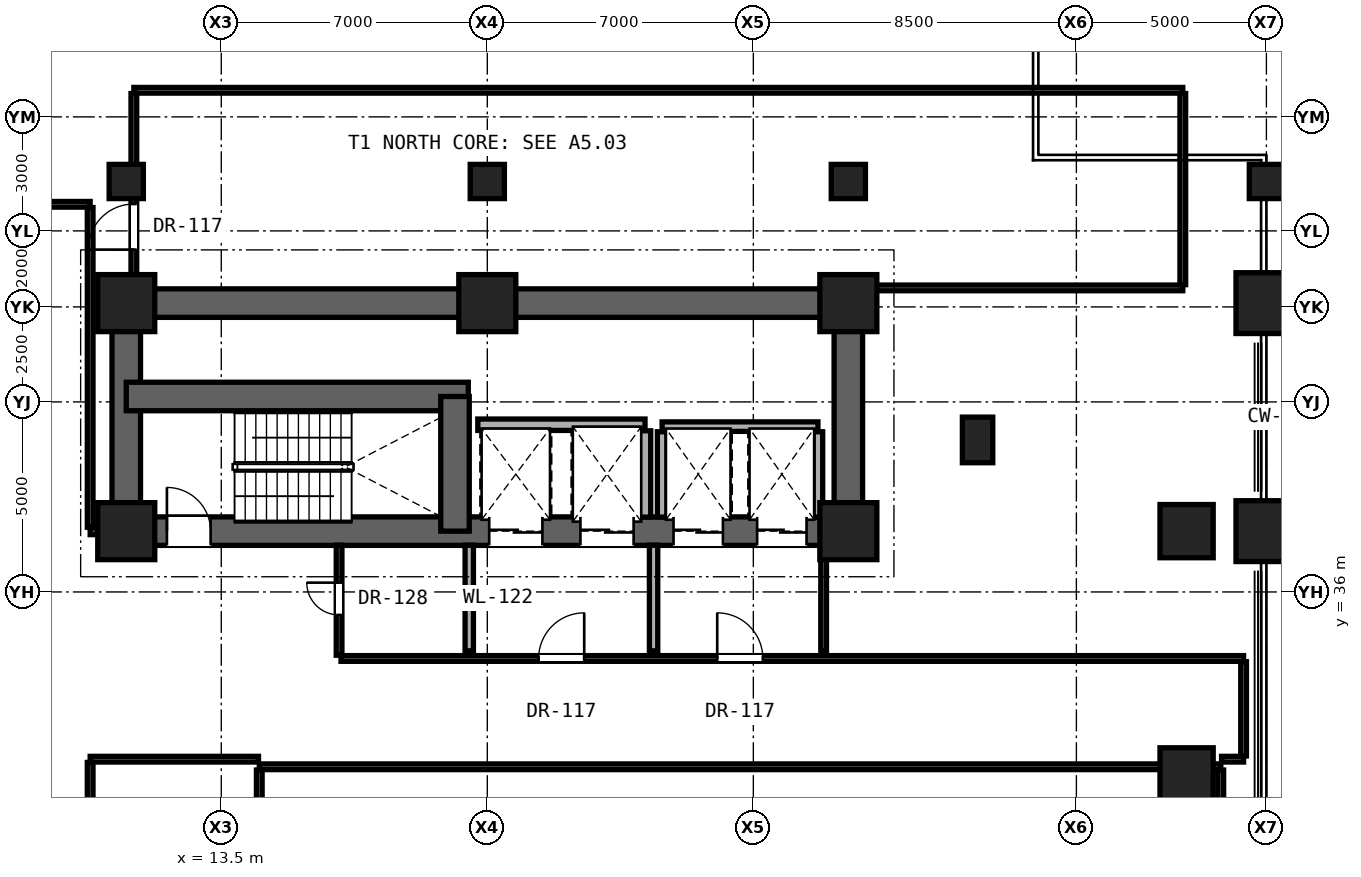
"""IFC4 building model, lengths in metres.
Left out: names, types, materials, properties, quantities, classifications, styles, units other than length and angle.
Written with IfcOpenShell. Run it as: python <this file> out.ifc"""

import sys

from ifc_helpers import new_model, si_unit, direction, frame, frame_2d, origin, origin_2d, place, context, subcontext, project, spatial, rectangle, hollow_rectangle, extrude, element, fill, save


model = new_model("IFC4")
c1 = context("Model", 3, precision=1e-05, world=origin(), true_north=direction((0.0, 1.0)))
c2 = subcontext(c1, "Body", "Model", "MODEL_VIEW")
j1 = project(units=[si_unit("LENGTHUNIT", "METRE"), si_unit("PLANEANGLEUNIT", "RADIAN")], contexts=[c1])
p1 = place(None, origin())
s1 = spatial("IfcSite", under=j1, at=p1, CompositionType="ELEMENT")
p2 = place(p1, origin())
s2 = spatial("IfcBuilding", under=s1, at=p2, CompositionType="ELEMENT")
p3 = place(p2, frame((0.0, 0.0, 9.5)))
s3 = spatial("IfcBuildingStorey", under=s2, at=p3, CompositionType="ELEMENT", Elevation=9.5)
for number, where, z_axis, x_axis in (
    (1, (11.0, 37.6, 0.0), (0.0, 0.0, 1.0), (1.0, 0.0, 0.0)),
    (2, (30.0, 37.6, 0.0), (0.0, 0.0, 1.0), (1.0, 0.0, 0.0)),
    (3, (11.0, 43.6, 0.0), (0.0, 0.0, 1.0), (1.0, 0.0, 0.0)),
    (4, (20.5, 43.6, 0.0), (0.0, 0.0, 1.0), (1.0, 0.0, 0.0)),
    (5, (30.0, 43.6, 0.0), (0.0, 0.0, 1.0), (1.0, 0.0, 0.0)),
):
    element("IfcColumn", number, at=place(p3, frame(where, z_axis=z_axis, x_axis=x_axis)), inside=s3, PredefinedType="COLUMN", context=c2, shape_type="SweptSolid", body=[
        extrude(rectangle(XDim=1.5, YDim=1.5, at=origin_2d()), origin(), (0.0, 0.0, 1.0), 4.3),
    ])
for number, where, z_axis, x_axis in (
    (6, (38.9, 31.2, 0.0), (0.0, 0.0, 1.0), (1.0, 0.0, 0.0)),
    (7, (38.9, 37.6, 0.0), (0.0, 0.0, 1.0), (1.0, 0.0, 0.0)),
):
    element("IfcColumn", number, at=place(p3, frame(where, z_axis=z_axis, x_axis=x_axis)), inside=s3, PredefinedType="COLUMN", context=c2, shape_type="SweptSolid", body=[
        extrude(hollow_rectangle(XDim=1.4, YDim=1.4, WallThickness=0.08, at=origin_2d()), origin(), (0.0, 0.0, 1.0), 4.3),
    ])
p4 = place(p3, frame((33.4, 40.0, 0.0), z_axis=(0.0, 0.0, 1.0), x_axis=(1.0, 0.0, 0.0)))
e8 = element("IfcColumn", 8, at=p4, inside=s3, PredefinedType="PILASTER", context=c2, shape_type="SweptSolid", body=[
    extrude(rectangle(XDim=0.8, YDim=1.2, at=origin_2d()), origin(), (0.0, 0.0, 1.0), 4.3),
])
p5 = place(p3, frame((11.0, 43.6, 0.0), z_axis=(0.0, 0.0, 1.0), x_axis=(1.0, 0.0, 0.0)))
e9 = element("IfcWall", 9, at=p5, inside=s3, PredefinedType="SHEAR", context=c2, shape_type="SweptSolid", body=[
    extrude(rectangle(XDim=19.0, YDim=0.75, at=frame_2d((9.5, 0.0))), origin(), (0.0, 0.0, 1.0), 3.98),
])
for number, where, z_axis, x_axis in (
    (10, (11.0, 37.6, 0.0), (0.0, 0.0, 1.0), (0.0, 1.0, 0.0)),
    (11, (30.0, 37.6, 0.0), (0.0, 0.0, 1.0), (0.0, 1.0, 0.0)),
):
    element("IfcWall", number, at=place(p3, frame(where, z_axis=z_axis, x_axis=x_axis)), inside=s3, PredefinedType="SHEAR", context=c2, shape_type="SweptSolid", body=[
        extrude(rectangle(XDim=6.0, YDim=0.75, at=frame_2d((3.0, 0.0))), origin(), (0.0, 0.0, 1.0), 3.98),
    ])
p6 = place(p3, frame((11.0, 37.6, 0.0), z_axis=(0.0, 0.0, 1.0), x_axis=(1.0, 0.0, 0.0)))
e12 = element("IfcWall", 12, at=p6, inside=s3, PredefinedType="SHEAR", context=c2, shape_type="SweptSolid", body=[
    extrude(rectangle(XDim=19.0, YDim=0.75, at=frame_2d((9.5, 0.0))), origin(), (0.0, 0.0, 1.0), 3.98),
])
p7 = place(p6, frame((1.07, 0.0, 0.0)))
e13 = element("IfcOpeningElement", 13, at=p7, cuts=e12, PredefinedType="OPENING", context=c2, shape_type="SweptSolid", body=[
    extrude(rectangle(XDim=1.15, YDim=2.2, at=frame_2d((0.575, 1.1))), frame((0.0, 0.385, 0.0), z_axis=(0.0, -1.0, 0.0), x_axis=(1.0, 0.0, 0.0)), (0.0, 0.0, 1.0), 0.77),
])
p8 = place(p6, frame((9.55, 0.0, 0.0)))
e14 = element("IfcOpeningElement", 14, at=p8, cuts=e12, PredefinedType="OPENING", context=c2, shape_type="SweptSolid", body=[
    extrude(rectangle(XDim=1.4, YDim=2.35, at=frame_2d((0.7, 1.175))), frame((0.0, 0.385, 0.0), z_axis=(0.0, -1.0, 0.0), x_axis=(1.0, 0.0, 0.0)), (0.0, 0.0, 1.0), 0.77),
])
p9 = place(p6, frame((11.95, 0.0, 0.0)))
e15 = element("IfcOpeningElement", 15, at=p9, cuts=e12, PredefinedType="OPENING", context=c2, shape_type="SweptSolid", body=[
    extrude(rectangle(XDim=1.4, YDim=2.35, at=frame_2d((0.7, 1.175))), frame((0.0, 0.385, 0.0), z_axis=(0.0, -1.0, 0.0), x_axis=(1.0, 0.0, 0.0)), (0.0, 0.0, 1.0), 0.77),
])
p10 = place(p6, frame((14.4, 0.0, 0.0)))
e16 = element("IfcOpeningElement", 16, at=p10, cuts=e12, PredefinedType="OPENING", context=c2, shape_type="SweptSolid", body=[
    extrude(rectangle(XDim=1.3, YDim=2.3, at=frame_2d((0.65, 1.15))), frame((0.0, 0.385, 0.0), z_axis=(0.0, -1.0, 0.0), x_axis=(1.0, 0.0, 0.0)), (0.0, 0.0, 1.0), 0.77),
])
p11 = place(p6, frame((16.6, 0.0, 0.0)))
e17 = element("IfcOpeningElement", 17, at=p11, cuts=e12, PredefinedType="OPENING", context=c2, shape_type="SweptSolid", body=[
    extrude(rectangle(XDim=1.3, YDim=2.3, at=frame_2d((0.65, 1.15))), frame((0.0, 0.385, 0.0), z_axis=(0.0, -1.0, 0.0), x_axis=(1.0, 0.0, 0.0)), (0.0, 0.0, 1.0), 0.77),
])
p12 = place(p3, frame((11.0, 41.143, 0.0), z_axis=(0.0, 0.0, 1.0), x_axis=(1.0, 0.0, 0.0)))
e18 = element("IfcWall", 18, at=p12, inside=s3, PredefinedType="SHEAR", context=c2, shape_type="SweptSolid", body=[
    extrude(rectangle(XDim=9.0, YDim=0.75, at=frame_2d((4.5, 0.0))), origin(), (0.0, 0.0, 1.0), 3.98),
])
p13 = place(p3, frame((19.65, 37.6, 0.0), z_axis=(0.0, 0.0, 1.0), x_axis=(0.0, 1.0, 0.0)))
e19 = element("IfcWall", 19, at=p13, inside=s3, PredefinedType="SHEAR", context=c2, shape_type="SweptSolid", body=[
    extrude(rectangle(XDim=3.543, YDim=0.75, at=frame_2d((1.771, 0.0))), origin(), (0.0, 0.0, 1.0), 3.98),
])
for number, where, z_axis, x_axis in (
    (20, (41.0, 37.6, 0.0), (0.0, 0.0, 1.0), (1.0, 0.0, 0.0)),
    (21, (41.0, 43.6, 0.0), (0.0, 0.0, 1.0), (1.0, 0.0, 0.0)),
):
    element("IfcColumn", number, at=place(p3, frame(where, z_axis=z_axis, x_axis=x_axis)), inside=s3, PredefinedType="COLUMN", context=c2, shape_type="SweptSolid", body=[
        extrude(rectangle(XDim=1.6, YDim=1.6, at=origin_2d()), origin(), (0.0, 0.0, 1.0), 4.3),
    ])
for number, where, z_axis, x_axis in (
    (22, (11.0, 46.8, 0.0), (0.0, 0.0, 1.0), (1.0, 0.0, 0.0)),
    (23, (20.5, 46.8, 0.0), (0.0, 0.0, 1.0), (1.0, 0.0, 0.0)),
    (24, (30.0, 46.8, 0.0), (0.0, 0.0, 1.0), (1.0, 0.0, 0.0)),
    (25, (41.0, 46.8, 0.0), (0.0, 0.0, 1.0), (1.0, 0.0, 0.0)),
):
    element("IfcColumn", number, at=place(p3, frame(where, z_axis=z_axis, x_axis=x_axis)), inside=s3, PredefinedType="COLUMN", context=c2, shape_type="SweptSolid", body=[
        extrude(rectangle(XDim=0.9, YDim=0.9, at=origin_2d()), origin(), (0.0, 0.0, 1.0), 4.3),
    ])
p14 = place(p3, frame((14.5, 31.4, 0.0), z_axis=(0.0, 0.0, 1.0), x_axis=(1.0, 0.0, 0.0)))
e26 = element("IfcWall", 26, at=p14, inside=s3, PredefinedType="PARTITIONING", context=c2, shape_type="SweptSolid", body=[
    extrude(rectangle(XDim=25.3, YDim=0.15, at=frame_2d((12.65, 0.0))), origin(), (0.0, 0.0, 1.0), 2.932),
])
p15 = place(p3, frame((10.05, 31.6, 0.0), z_axis=(0.0, 0.0, 1.0), x_axis=(1.0, 0.0, 0.0)))
e27 = element("IfcWall", 27, at=p15, inside=s3, PredefinedType="PARTITIONING", context=c2, shape_type="SweptSolid", body=[
    extrude(rectangle(XDim=4.43, YDim=0.15, at=frame_2d((2.215, 0.0))), origin(), (0.0, 0.0, 1.0), 2.932),
])
p16 = place(p3, frame((39.82, 31.6, 0.0), z_axis=(0.0, 0.0, 1.0), x_axis=(1.0, 0.0, 0.0)))
e28 = element("IfcWall", 28, at=p16, inside=s3, PredefinedType="PARTITIONING", context=c2, shape_type="SweptSolid", body=[
    extrude(rectangle(XDim=0.58, YDim=0.15, at=frame_2d((0.29, 0.0))), origin(), (0.0, 0.0, 1.0), 3.98),
])
p17 = place(p3, frame((16.65, 34.25, 0.0), z_axis=(0.0, 0.0, 1.0), x_axis=(1.0, 0.0, 0.0)))
e29 = element("IfcWall", 29, at=p17, inside=s3, PredefinedType="PARTITIONING", context=c2, shape_type="SweptSolid", body=[
    extrude(rectangle(XDim=23.75, YDim=0.15, at=frame_2d((11.875, 0.0))), origin(), (0.0, 0.0, 1.0), 2.932),
])
p18 = place(p17, frame((5.2, 0.0, 0.0)))
e30 = element("IfcOpeningElement", 30, at=p18, cuts=e29, PredefinedType="OPENING", context=c2, shape_type="SweptSolid", body=[
    extrude(rectangle(XDim=1.2, YDim=2.25, at=frame_2d((0.6, 1.125))), frame((0.0, 0.085, 0.0), z_axis=(0.0, -1.0, 0.0), x_axis=(1.0, 0.0, 0.0)), (0.0, 0.0, 1.0), 0.17),
])
p19 = place(p17, frame((9.9, 0.0, 0.0)))
e31 = element("IfcOpeningElement", 31, at=p19, cuts=e29, PredefinedType="OPENING", context=c2, shape_type="SweptSolid", body=[
    extrude(rectangle(XDim=1.2, YDim=2.25, at=frame_2d((0.6, 1.125))), frame((0.0, 0.085, 0.0), z_axis=(0.0, -1.0, 0.0), x_axis=(1.0, 0.0, 0.0)), (0.0, 0.0, 1.0), 0.17),
])
p20 = place(p3, frame((10.05, 37.6, 0.0), z_axis=(0.0, 0.0, 1.0), x_axis=(1.0, 0.0, 0.0)))
e32 = element("IfcWall", 32, at=p20, inside=s3, PredefinedType="SHEAR", context=c2, shape_type="SweptSolid", body=[
    extrude(rectangle(XDim=0.185, YDim=0.185, at=frame_2d((0.093, 0.0))), origin(), (0.0, 0.0, 1.0), 3.98),
])
p21 = place(p3, frame((25.1, 40.35, 0.0), z_axis=(0.0, 0.0, 1.0), x_axis=(1.0, 0.0, 0.0)))
e33 = element("IfcWall", 33, at=p21, inside=s3, PredefinedType="SOLIDWALL", context=c2, shape_type="SweptSolid", body=[
    extrude(rectangle(XDim=4.1, YDim=0.25, at=frame_2d((2.05, 0.0))), origin(), (0.0, 0.0, 1.0), 3.98),
])
p22 = place(p3, frame((20.25, 40.4, 0.0), z_axis=(0.0, 0.0, 1.0), x_axis=(1.0, 0.0, 0.0)))
e34 = element("IfcWall", 34, at=p22, inside=s3, PredefinedType="SOLIDWALL", context=c2, shape_type="SweptSolid", body=[
    extrude(rectangle(XDim=4.4, YDim=0.3, at=frame_2d((2.2, 0.0))), origin(), (0.0, 0.0, 1.0), 3.98),
])
p23 = place(p3, frame((30.02, 44.0, 0.0), z_axis=(0.0, 0.0, 1.0), x_axis=(1.0, 0.0, 0.0)))
e35 = element("IfcWall", 35, at=p23, inside=s3, PredefinedType="PARTITIONING", context=c2, shape_type="SweptSolid", body=[
    extrude(rectangle(XDim=8.78, YDim=0.15, at=frame_2d((4.39, 0.0))), origin(), (0.0, 0.0, 1.0), 3.199),
])
p24 = place(p3, frame((7.8, 46.2, 0.0), z_axis=(0.0, 0.0, 1.0), x_axis=(1.0, 0.0, 0.0)))
e36 = element("IfcWall", 36, at=p24, inside=s3, PredefinedType="PARTITIONING", context=c2, shape_type="SweptSolid", body=[
    extrude(rectangle(XDim=2.25, YDim=0.15, at=frame_2d((1.125, 0.0))), origin(), (0.0, 0.0, 1.0), 3.98),
])
p25 = place(p3, frame((11.2, 49.2, 0.0), z_axis=(0.0, 0.0, 1.0), x_axis=(1.0, 0.0, 0.0)))
e37 = element("IfcWall", 37, at=p25, inside=s3, PredefinedType="PARTITIONING", context=c2, shape_type="SweptSolid", body=[
    extrude(rectangle(XDim=27.6, YDim=0.15, at=frame_2d((13.8, 0.0))), origin(), (0.0, 0.0, 1.0), 3.98),
])
p26 = place(p3, frame((10.05, 23.685, 0.0), z_axis=(0.0, 0.0, 1.0), x_axis=(0.0, 1.0, 0.0)))
e38 = element("IfcWall", 38, at=p26, inside=s3, PredefinedType="PARTITIONING", context=c2, shape_type="SweptSolid", body=[
    extrude(rectangle(XDim=7.83, YDim=0.15, at=frame_2d((3.915, 0.0))), origin(), (0.0, 0.0, 1.0), 3.199),
])
p27 = place(p3, frame((10.05, 37.702, 0.0), z_axis=(0.0, 0.0, 1.0), x_axis=(0.0, 1.0, 0.0)))
e39 = element("IfcWall", 39, at=p27, inside=s3, PredefinedType="PARTITIONING", context=c2, shape_type="SweptSolid", body=[
    extrude(rectangle(XDim=8.413, YDim=0.15, at=frame_2d((4.206, 0.0))), origin(), (0.0, 0.0, 1.0), 2.872),
])
p28 = place(p3, frame((11.2, 44.0, 0.0), z_axis=(0.0, 0.0, 1.0), x_axis=(0.0, 1.0, 0.0)))
e40 = element("IfcWall", 40, at=p28, inside=s3, PredefinedType="PARTITIONING", context=c2, shape_type="SweptSolid", body=[
    extrude(rectangle(XDim=5.115, YDim=0.15, at=frame_2d((2.558, 0.0))), origin(), (0.0, 0.0, 1.0), 3.199),
])
p29 = place(p28, frame((1.008, 0.0, 0.0)))
e41 = element("IfcOpeningElement", 41, at=p29, cuts=e40, PredefinedType="OPENING", context=c2, shape_type="SweptSolid", body=[
    extrude(rectangle(XDim=1.2, YDim=2.25, at=frame_2d((0.6, 1.125))), frame((0.0, 0.085, 0.0), z_axis=(0.0, -1.0, 0.0), x_axis=(1.0, 0.0, 0.0)), (0.0, 0.0, 1.0), 0.17),
])
p30 = place(p3, frame((14.5, 21.0, 0.0), z_axis=(0.0, 0.0, 1.0), x_axis=(0.0, 1.0, 0.0)))
e42 = element("IfcWall", 42, at=p30, inside=s3, PredefinedType="PARTITIONING", context=c2, shape_type="SweptSolid", body=[
    extrude(rectangle(XDim=10.315, YDim=0.15, at=frame_2d((5.157, 0.0))), origin(), (0.0, 0.0, 1.0), 2.932),
])
p31 = place(p3, frame((16.6, 34.335, 0.0), z_axis=(0.0, 0.0, 1.0), x_axis=(0.0, 1.0, 0.0)))
e43 = element("IfcWall", 43, at=p31, inside=s3, PredefinedType="PARTITIONING", context=c2, shape_type="SweptSolid", body=[
    extrude(rectangle(XDim=2.895, YDim=0.15, at=frame_2d((1.448, 0.0))), origin(), (0.0, 0.0, 1.0), 3.98),
])
p32 = place(p31, frame((1.06, 0.0, 0.0)))
e44 = element("IfcOpeningElement", 44, at=p32, cuts=e43, PredefinedType="OPENING", context=c2, shape_type="SweptSolid", body=[
    extrude(rectangle(XDim=0.85, YDim=2.01, at=frame_2d((0.425, 1.005))), frame((0.0, 0.085, 0.0), z_axis=(0.0, -1.0, 0.0), x_axis=(1.0, 0.0, 0.0)), (0.0, 0.0, 1.0), 0.17),
])
p33 = place(p3, frame((20.025, 34.45, 0.0), z_axis=(0.0, 0.0, 1.0), x_axis=(0.0, 1.0, 0.0)))
e45 = element("IfcWall", 45, at=p33, inside=s3, PredefinedType="SOLIDWALL", context=c2, shape_type="SweptSolid", body=[
    extrude(rectangle(XDim=2.78, YDim=0.22, at=frame_2d((1.39, 0.0))), origin(), (0.0, 0.0, 1.0), 3.98),
])
p34 = place(p3, frame((24.65, 37.97, 0.0), z_axis=(0.0, 0.0, 1.0), x_axis=(0.0, 1.0, 0.0)))
e46 = element("IfcWall", 46, at=p34, inside=s3, PredefinedType="SOLIDWALL", context=c2, shape_type="SweptSolid", body=[
    extrude(rectangle(XDim=2.27, YDim=0.3, at=frame_2d((1.135, 0.0))), origin(), (0.0, 0.0, 1.0), 3.98),
])
p35 = place(p3, frame((24.875, 34.45, 0.0), z_axis=(0.0, 0.0, 1.0), x_axis=(0.0, 1.0, 0.0)))
e47 = element("IfcWall", 47, at=p35, inside=s3, PredefinedType="SOLIDWALL", context=c2, shape_type="SweptSolid", body=[
    extrude(rectangle(XDim=2.78, YDim=0.22, at=frame_2d((1.39, 0.0))), origin(), (0.0, 0.0, 1.0), 3.98),
])
p36 = place(p3, frame((25.1, 37.97, 0.0), z_axis=(0.0, 0.0, 1.0), x_axis=(0.0, 1.0, 0.0)))
e48 = element("IfcWall", 48, at=p36, inside=s3, PredefinedType="SOLIDWALL", context=c2, shape_type="SweptSolid", body=[
    extrude(rectangle(XDim=2.245, YDim=0.25, at=frame_2d((1.123, 0.0))), origin(), (0.0, 0.0, 1.0), 3.98),
])
p37 = place(p3, frame((29.35, 34.45, 0.0), z_axis=(0.0, 0.0, 1.0), x_axis=(0.0, 1.0, 0.0)))
e49 = element("IfcWall", 49, at=p37, inside=s3, PredefinedType="PARTITIONING", context=c2, shape_type="SweptSolid", body=[
    extrude(rectangle(XDim=2.78, YDim=0.15, at=frame_2d((1.39, 0.0))), origin(), (0.0, 0.0, 1.0), 3.98),
])
p38 = place(p3, frame((29.2, 37.97, 0.0), z_axis=(0.0, 0.0, 1.0), x_axis=(0.0, 1.0, 0.0)))
e50 = element("IfcWall", 50, at=p38, inside=s3, PredefinedType="SOLIDWALL", context=c2, shape_type="SweptSolid", body=[
    extrude(rectangle(XDim=2.245, YDim=0.25, at=frame_2d((1.123, 0.0))), origin(), (0.0, 0.0, 1.0), 3.98),
])
p39 = place(p3, frame((38.8, 44.085, 0.0), z_axis=(0.0, 0.0, 1.0), x_axis=(0.0, 1.0, 0.0)))
e51 = element("IfcWall", 51, at=p39, inside=s3, PredefinedType="PARTITIONING", context=c2, shape_type="SweptSolid", body=[
    extrude(rectangle(XDim=5.03, YDim=0.15, at=frame_2d((2.515, 0.0))), origin(), (0.0, 0.0, 1.0), 3.199),
])
p40 = place(p3, frame((39.8, 21.0, 0.0), z_axis=(0.0, 0.0, 1.0), x_axis=(0.0, 1.0, 0.0)))
e52 = element("IfcWall", 52, at=p40, inside=s3, PredefinedType="PARTITIONING", context=c2, shape_type="SweptSolid", body=[
    extrude(rectangle(XDim=10.315, YDim=0.15, at=frame_2d((5.157, 0.0))), origin(), (0.0, 0.0, 1.0), 3.98),
])
p41 = place(p3, frame((40.4, 31.685, 0.0), z_axis=(0.0, 0.0, 1.0), x_axis=(0.0, 1.0, 0.0)))
e53 = element("IfcWall", 53, at=p41, inside=s3, PredefinedType="PARTITIONING", context=c2, shape_type="SweptSolid", body=[
    extrude(rectangle(XDim=2.48, YDim=0.15, at=frame_2d((1.24, 0.0))), origin(), (0.0, 0.0, 1.0), 3.98),
])
p42 = place(p7, origin())
e54 = element("IfcDoor", 54, at=p42, inside=s3, OperationType="SINGLE_SWING_LEFT", PredefinedType="DOOR", context=c2, shape_type="SweptSolid", body=[
    extrude(rectangle(XDim=1.15, YDim=2.2, at=frame_2d((0.575, 1.1))), frame((0.0, 0.025, 0.0), z_axis=(0.0, -1.0, 0.0), x_axis=(1.0, 0.0, 0.0)), (0.0, 0.0, 1.0), 0.05),
])
fill(e13, e54)
p43 = place(p18, origin())
e55 = element("IfcDoor", 55, at=p43, inside=s3, OperationType="SINGLE_SWING_RIGHT", PredefinedType="DOOR", context=c2, shape_type="SweptSolid", body=[
    extrude(rectangle(XDim=1.2, YDim=2.25, at=frame_2d((0.6, 1.125))), frame((0.0, 0.025, 0.0), z_axis=(0.0, -1.0, 0.0), x_axis=(1.0, 0.0, 0.0)), (0.0, 0.0, 1.0), 0.05),
])
fill(e30, e55)
p44 = place(p19, origin())
e56 = element("IfcDoor", 56, at=p44, inside=s3, OperationType="SINGLE_SWING_LEFT", PredefinedType="DOOR", context=c2, shape_type="SweptSolid", body=[
    extrude(rectangle(XDim=1.2, YDim=2.25, at=frame_2d((0.6, 1.125))), frame((0.0, 0.025, 0.0), z_axis=(0.0, -1.0, 0.0), x_axis=(1.0, 0.0, 0.0)), (0.0, 0.0, 1.0), 0.05),
])
fill(e31, e56)
p45 = place(p32, origin())
e57 = element("IfcDoor", 57, at=p45, inside=s3, OperationType="SINGLE_SWING_RIGHT", PredefinedType="DOOR", context=c2, shape_type="SweptSolid", body=[
    extrude(rectangle(XDim=0.85, YDim=2.01, at=frame_2d((0.425, 1.005))), frame((0.0, 0.025, 0.0), z_axis=(0.0, -1.0, 0.0), x_axis=(1.0, 0.0, 0.0)), (0.0, 0.0, 1.0), 0.05),
])
fill(e44, e57)
p46 = place(p29, origin())
e58 = element("IfcDoor", 58, at=p46, inside=s3, OperationType="SINGLE_SWING_LEFT", PredefinedType="DOOR", context=c2, shape_type="SweptSolid", body=[
    extrude(rectangle(XDim=1.2, YDim=2.25, at=frame_2d((0.6, 1.125))), frame((0.0, 0.025, 0.0), z_axis=(0.0, -1.0, 0.0), x_axis=(1.0, 0.0, 0.0)), (0.0, 0.0, 1.0), 0.05),
])
fill(e41, e58)
p47 = place(p8, origin())
e59 = element("IfcDoor", 59, at=p47, inside=s3, OperationType="DOUBLE_DOOR_SLIDING", PredefinedType="DOOR", context=c2, shape_type="SweptSolid", body=[
    extrude(rectangle(XDim=1.4, YDim=2.35, at=frame_2d((0.7, 1.175))), frame((0.0, 0.025, 0.0), z_axis=(0.0, -1.0, 0.0), x_axis=(1.0, 0.0, 0.0)), (0.0, 0.0, 1.0), 0.05),
])
fill(e14, e59)
p48 = place(p9, origin())
e60 = element("IfcDoor", 60, at=p48, inside=s3, OperationType="DOUBLE_DOOR_SLIDING", PredefinedType="DOOR", context=c2, shape_type="SweptSolid", body=[
    extrude(rectangle(XDim=1.4, YDim=2.35, at=frame_2d((0.7, 1.175))), frame((0.0, 0.025, 0.0), z_axis=(0.0, -1.0, 0.0), x_axis=(1.0, 0.0, 0.0)), (0.0, 0.0, 1.0), 0.05),
])
fill(e15, e60)
p49 = place(p10, origin())
e61 = element("IfcDoor", 61, at=p49, inside=s3, OperationType="DOUBLE_DOOR_SLIDING", PredefinedType="DOOR", context=c2, shape_type="SweptSolid", body=[
    extrude(rectangle(XDim=1.3, YDim=2.3, at=frame_2d((0.65, 1.15))), frame((0.0, 0.025, 0.0), z_axis=(0.0, -1.0, 0.0), x_axis=(1.0, 0.0, 0.0)), (0.0, 0.0, 1.0), 0.05),
])
fill(e16, e61)
p50 = place(p11, origin())
e62 = element("IfcDoor", 62, at=p50, inside=s3, OperationType="DOUBLE_DOOR_SLIDING", PredefinedType="DOOR", context=c2, shape_type="SweptSolid", body=[
    extrude(rectangle(XDim=1.3, YDim=2.3, at=frame_2d((0.65, 1.15))), frame((0.0, 0.025, 0.0), z_axis=(0.0, -1.0, 0.0), x_axis=(1.0, 0.0, 0.0)), (0.0, 0.0, 1.0), 0.05),
])
fill(e17, e62)
save(model, sys.argv[1])
